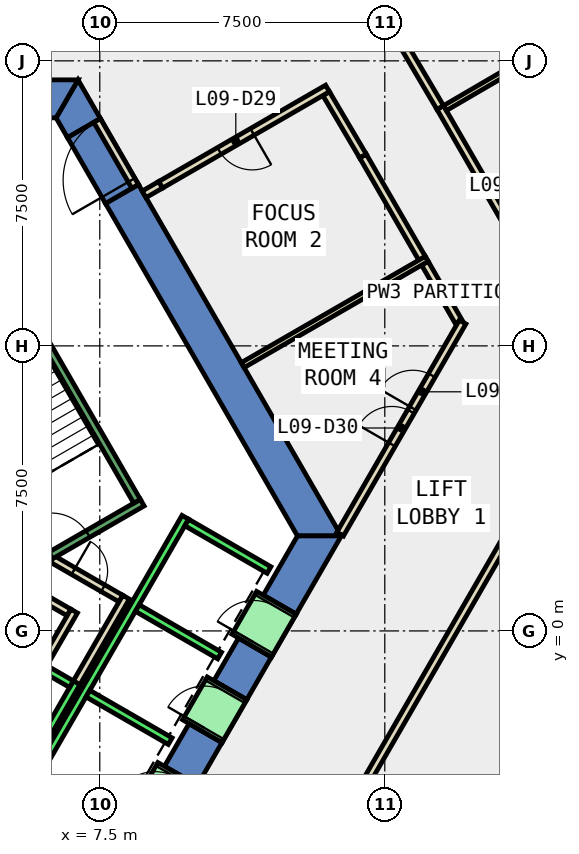
"""IFC4 building model, lengths in metres.
Left out: names, types, materials, properties, quantities, classifications, styles, units other than length and angle.
Written with IfcOpenShell. Run it as: python <this file> out.ifc"""

import sys

from ifc_helpers import new_model, si_unit, direction, frame, frame_2d, origin, place, context, subcontext, project, spatial, polyline, rectangle, outline, extrude, element, fill, save


model = new_model("IFC4")
c1 = context("Model", 3, precision=1e-05, world=origin(), true_north=direction((0.0, 1.0)))
c2 = subcontext(c1, "Body", "Model", "MODEL_VIEW")
j1 = project(units=[si_unit("LENGTHUNIT", "METRE"), si_unit("PLANEANGLEUNIT", "RADIAN")], contexts=[c1])
p1 = place(None, origin())
s1 = spatial("IfcSite", under=j1, at=p1, CompositionType="ELEMENT")
p2 = place(p1, origin())
s2 = spatial("IfcBuilding", under=s1, at=p2, CompositionType="ELEMENT")
p3 = place(p2, frame((0.0, 0.0, 47.6)))
s3 = spatial("IfcBuildingStorey", under=s2, at=p3, CompositionType="ELEMENT", Elevation=47.6)
p4 = place(p3, frame((0.0, 0.0, -0.4)))
e1 = element("IfcWall", 1, at=p4, inside=s3, PredefinedType="SHEAR", context=c2, shape_type="SweptSolid", body=[
    extrude(outline(polyline([(8.517, 11.748), (7.651, 11.248), (12.702, 2.5), (13.856, 2.5), (8.517, 11.748)])), origin(), (0.0, 0.0, 1.0), 4.2),
])
p5 = place(p3, frame((0.0, 0.0, -0.4)))
e2 = element("IfcWall", 2, at=p5, inside=s3, PredefinedType="SHEAR", context=c2, shape_type="SweptSolid", body=[
    extrude(outline(polyline([(6.651, 12.98), (7.517, 13.48), (6.928, 14.5), (6.351, 13.5), (6.651, 12.98)])), origin(), (0.0, 0.0, 1.0), 4.2),
])
p6 = place(p3, frame((0.0, 0.0, 3.6)))
e3 = element("IfcWall", 3, at=p6, inside=s3, PredefinedType="SHEAR", context=c2, shape_type="SweptSolid", body=[
    extrude(outline(polyline([(7.517, 13.48), (6.651, 12.98), (7.651, 11.248), (8.517, 11.748), (7.517, 13.48)])), origin(), (0.0, 0.0, 1.0), 0.2),
])
p7 = place(p3, frame((0.0, 0.0, -0.4)))
e4 = element("IfcWall", 4, at=p7, inside=s3, PredefinedType="SHEAR", context=c2, shape_type="SweptSolid", body=[
    extrude(outline(polyline([(4.55, 14.5), (4.55, 13.5), (6.351, 13.5), (6.928, 14.5), (4.55, 14.5)])), origin(), (0.0, 0.0, 1.0), 4.2),
])
p8 = place(p3, frame((0.0, 0.0, -0.4)))
e5 = element("IfcWall", 5, at=p8, inside=s3, PredefinedType="SHEAR", context=c2, shape_type="SweptSolid", body=[
    extrude(outline(polyline([(10.717, -2.937), (9.851, -2.437), (9.201, -3.563), (10.067, -4.063), (10.717, -2.937)])), origin(), (0.0, 0.0, 1.0), 4.2),
])
p9 = place(p3, frame((0.0, 0.0, -0.4)))
e6 = element("IfcWall", 6, at=p9, inside=s3, PredefinedType="SHEAR", context=c2, shape_type="SweptSolid", body=[
    extrude(outline(polyline([(12.017, -0.686), (11.151, -0.186), (10.501, -1.311), (11.367, -1.811), (12.017, -0.686)])), origin(), (0.0, 0.0, 1.0), 4.2),
])
p10 = place(p3, frame((0.0, 0.0, -0.4)))
e7 = element("IfcWall", 7, at=p10, inside=s3, PredefinedType="SHEAR", context=c2, shape_type="SweptSolid", body=[
    extrude(outline(polyline([(11.801, 0.94), (12.667, 0.44), (13.856, 2.5), (12.702, 2.5), (11.801, 0.94)])), origin(), (0.0, 0.0, 1.0), 4.2),
])
p11 = place(p3, frame((0.0, 0.0, 3.6)))
e8 = element("IfcWall", 8, at=p11, inside=s3, PredefinedType="SHEAR", context=c2, shape_type="SweptSolid", body=[
    extrude(outline(polyline([(10.067, -4.063), (9.201, -3.563), (8.551, -4.689), (9.417, -5.189), (10.067, -4.063)])), origin(), (0.0, 0.0, 1.0), 0.2),
])
p12 = place(p3, frame((0.0, 0.0, 3.6)))
e9 = element("IfcWall", 9, at=p12, inside=s3, PredefinedType="SHEAR", context=c2, shape_type="SweptSolid", body=[
    extrude(outline(polyline([(11.367, -1.811), (10.501, -1.311), (9.851, -2.437), (10.717, -2.937), (11.367, -1.811)])), origin(), (0.0, 0.0, 1.0), 0.2),
])
p13 = place(p3, frame((0.0, 0.0, 3.6)))
e10 = element("IfcWall", 10, at=p13, inside=s3, PredefinedType="SHEAR", context=c2, shape_type="SweptSolid", body=[
    extrude(outline(polyline([(12.667, 0.44), (11.801, 0.94), (11.151, -0.186), (12.017, -0.686), (12.667, 0.44)])), origin(), (0.0, 0.0, 1.0), 0.2),
])
p14 = place(p3, frame((15.98, 9.805, 0.0), z_axis=(0.0, 0.0, 1.0), x_axis=(-0.500150684419, 0.865938388614, 0.0)))
e11 = element("IfcWall", 11, at=p14, inside=s3, PredefinedType="PARTITIONING", context=c2, shape_type="SweptSolid", body=[
    extrude(rectangle(XDim=3.109, YDim=0.2, at=frame_2d((1.554, 0.0))), origin(), (0.0, 0.0, 1.0), 3.8),
])
p15 = place(p3, frame((14.425, 12.497, 0.0), z_axis=(0.0, 0.0, 1.0), x_axis=(-0.508111788435, 0.861291129905, 0.0)))
e12 = element("IfcWall", 12, at=p15, inside=s3, PredefinedType="PARTITIONING", context=c2, shape_type="SweptSolid", body=[
    extrude(rectangle(XDim=1.905, YDim=0.2, at=frame_2d((0.953, 0.0))), origin(), (0.0, 0.0, 1.0), 3.8),
])
p16 = place(p3, frame((13.492, 14.274, 0.0), z_axis=(0.0, 0.0, 1.0), x_axis=(-0.866003598361, -0.5000377662, 0.0)))
e13 = element("IfcWall", 13, at=p16, inside=s3, PredefinedType="PARTITIONING", context=c2, shape_type="SweptSolid", body=[
    extrude(rectangle(XDim=5.071, YDim=0.2, at=frame_2d((2.536, 0.0))), origin(), (0.0, 0.0, 1.0), 3.8),
])
p17 = place(p16, frame((2.286, 0.0, 0.0)))
e14 = element("IfcOpeningElement", 14, at=p17, cuts=e13, PredefinedType="OPENING", context=c2, shape_type="SweptSolid", body=[
    extrude(rectangle(XDim=1.0, YDim=2.1, at=frame_2d((0.5, 1.05))), frame((0.0, 0.11, 0.0), z_axis=(0.0, -1.0, 0.0), x_axis=(1.0, 0.0, 0.0)), (0.0, 0.0, 1.0), 0.22),
])
p18 = place(p3, frame((16.948, 8.128, 0.0), z_axis=(0.0, 0.0, 1.0), x_axis=(-0.499931460552, 0.866064971437, 0.0)))
e15 = element("IfcWall", 15, at=p18, inside=s3, PredefinedType="PARTITIONING", context=c2, shape_type="SweptSolid", body=[
    extrude(rectangle(XDim=1.786, YDim=0.2, at=frame_2d((0.893, 0.0))), origin(), (0.0, 0.0, 1.0), 3.8),
])
p19 = place(p3, frame((16.46, 13.772, 0.0), z_axis=(0.0, 0.0, 1.0), x_axis=(0.500099745063, -0.865967808286, 0.0)))
e16 = element("IfcWall", 16, at=p19, inside=s3, PredefinedType="PARTITIONING", context=c2, shape_type="SweptSolid", body=[
    extrude(rectangle(XDim=7.319, YDim=0.2, at=frame_2d((3.659, 0.0))), origin(), (0.0, 0.0, 1.0), 3.8),
])
p20 = place(p19, frame((3.159, 0.0, 0.0)))
e17 = element("IfcOpeningElement", 17, at=p20, cuts=e16, PredefinedType="OPENING", context=c2, shape_type="SweptSolid", body=[
    extrude(rectangle(XDim=1.0, YDim=2.1, at=frame_2d((0.5, 1.05))), frame((0.0, 0.11, 0.0), z_axis=(0.0, -1.0, 0.0), x_axis=(1.0, 0.0, 0.0)), (0.0, 0.0, 1.0), 0.22),
])
p21 = place(p3, frame((12.815, 19.946, 0.0), z_axis=(0.0, 0.0, 1.0), x_axis=(0.508287536166, -0.861187424768, 0.0)))
e18 = element("IfcWall", 18, at=p21, inside=s3, PredefinedType="PARTITIONING", context=c2, shape_type="SweptSolid", body=[
    extrude(rectangle(XDim=7.169, YDim=0.2, at=frame_2d((3.584, 0.0))), origin(), (0.0, 0.0, 1.0), 3.8),
])
p22 = place(p3, frame((5.499, 1.172, 0.0), z_axis=(0.0, 0.0, 1.0), x_axis=(0.866333505267, -0.499465972466, 0.0)))
e19 = element("IfcWall", 19, at=p22, inside=s3, PredefinedType="PARTITIONING", context=c2, shape_type="SweptSolid", body=[
    extrude(rectangle(XDim=1.374, YDim=0.2, at=frame_2d((0.687, 0.0))), origin(), (0.0, 0.0, 1.0), 3.8),
])
p23 = place(p3, frame((6.826, 0.522, 0.0), z_axis=(0.0, 0.0, 1.0), x_axis=(-0.500016722714, -0.866015748706, 0.0)))
e20 = element("IfcWall", 20, at=p23, inside=s3, PredefinedType="PARTITIONING", context=c2, shape_type="SweptSolid", body=[
    extrude(rectangle(XDim=1.7, YDim=0.2, at=frame_2d((0.85, 0.0))), origin(), (0.0, 0.0, 1.0), 3.8),
])
p24 = place(p3, frame((6.25, 1.894, 0.0), z_axis=(0.0, 0.0, 1.0), x_axis=(0.866043184279, -0.499969202016, 0.0)))
e21 = element("IfcWall", 21, at=p24, inside=s3, PredefinedType="PARTITIONING", context=c2, shape_type="SweptSolid", body=[
    extrude(rectangle(XDim=2.084, YDim=0.2, at=frame_2d((1.042, 0.0))), origin(), (0.0, 0.0, 1.0), 3.8),
])
p25 = place(p24, frame((0.642, 0.0, 0.0)))
e22 = element("IfcOpeningElement", 22, at=p25, cuts=e21, PredefinedType="OPENING", context=c2, shape_type="SweptSolid", body=[
    extrude(rectangle(XDim=0.9, YDim=2.1, at=frame_2d((0.45, 1.05))), frame((0.0, 0.11, 0.0), z_axis=(0.0, -1.0, 0.0), x_axis=(1.0, 0.0, 0.0)), (0.0, 0.0, 1.0), 0.22),
])
p26 = place(p3, frame((8.192, 0.888, 0.0), z_axis=(0.0, 0.0, 1.0), x_axis=(-0.499940625693, -0.866059680843, 0.0)))
e23 = element("IfcWall", 23, at=p26, inside=s3, PredefinedType="PARTITIONING", context=c2, shape_type="SweptSolid", body=[
    extrude(rectangle(XDim=2.68, YDim=0.2, at=frame_2d((1.34, 0.0))), origin(), (0.0, 0.0, 1.0), 3.8),
])
p27 = place(p3, frame((16.104, 9.79, 0.0), z_axis=(0.0, 0.0, 1.0), x_axis=(-0.866023462144, -0.500003363005, 0.0)))
e24 = element("IfcWall", 24, at=p27, inside=s3, PredefinedType="PARTITIONING", context=c2, shape_type="SweptSolid", body=[
    extrude(rectangle(XDim=5.592, YDim=0.15, at=frame_2d((2.796, 0.0))), origin(), (0.0, 0.0, 1.0), 3.8),
])
p28 = place(p3, frame((13.827, 2.55, 0.0), z_axis=(0.0, 0.0, 1.0), x_axis=(0.500093193185, 0.865971591988, 0.0)))
e25 = element("IfcWall", 25, at=p28, inside=s3, PredefinedType="PARTITIONING", context=c2, shape_type="SweptSolid", body=[
    extrude(rectangle(XDim=6.441, YDim=0.2, at=frame_2d((3.221, 0.0))), origin(), (0.0, 0.0, 1.0), 3.8),
])
p29 = place(p28, frame((2.721, 0.0, 0.0)))
e26 = element("IfcOpeningElement", 26, at=p29, cuts=e25, PredefinedType="OPENING", context=c2, shape_type="SweptSolid", body=[
    extrude(rectangle(XDim=1.0, YDim=2.1, at=frame_2d((0.5, 1.05))), frame((0.0, 0.11, 0.0), z_axis=(0.0, -1.0, 0.0), x_axis=(1.0, 0.0, 0.0)), (0.0, 0.0, 1.0), 0.22),
])
p30 = place(p28, frame((3.821, 0.0, 0.0)))
e27 = element("IfcOpeningElement", 27, at=p30, cuts=e25, PredefinedType="OPENING", context=c2, shape_type="SweptSolid", body=[
    extrude(rectangle(XDim=1.0, YDim=2.1, at=frame_2d((0.5, 1.05))), frame((0.0, 0.11, 0.0), z_axis=(0.0, -1.0, 0.0), x_axis=(1.0, 0.0, 0.0)), (0.0, 0.0, 1.0), 0.22),
])
p31 = place(p3, frame((19.257, 4.255, 0.0), z_axis=(0.0, 0.0, 1.0), x_axis=(-0.499978317034, -0.866037922089, 0.0)))
e28 = element("IfcWall", 28, at=p31, inside=s3, PredefinedType="PARTITIONING", context=c2, shape_type="SweptSolid", body=[
    extrude(rectangle(XDim=12.913, YDim=0.2, at=frame_2d((6.456, 0.0))), origin(), (0.0, 0.0, 1.0), 3.8),
])
p32 = place(p3, frame((16.584, 13.757, 0.0), z_axis=(0.0, 0.0, 1.0), x_axis=(0.863565634474, 0.504236447469, 0.0)))
e29 = element("IfcWall", 29, at=p32, inside=s3, PredefinedType="PARTITIONING", context=c2, shape_type="SweptSolid", body=[
    extrude(rectangle(XDim=5.981, YDim=0.15, at=frame_2d((2.99, 0.0))), origin(), (0.0, 0.0, 1.0), 3.8),
])
p33 = place(p3, frame((8.43, 11.698, 0.0), z_axis=(0.0, 0.0, 1.0), x_axis=(-0.50002537861, 0.866010750942, 0.0)))
e30 = element("IfcWall", 30, at=p33, inside=s3, PredefinedType="PARTITIONING", context=c2, shape_type="SweptSolid", body=[
    extrude(rectangle(XDim=2.0, YDim=0.2, at=frame_2d((1.0, 0.0))), origin(), (0.0, 0.0, 1.0), 2.4),
])
p34 = place(p33, frame((0.19, 0.0, 0.0)))
e31 = element("IfcOpeningElement", 31, at=p34, cuts=e30, PredefinedType="OPENING", context=c2, shape_type="SweptSolid", body=[
    extrude(rectangle(XDim=1.8, YDim=2.1, at=frame_2d((0.9, 1.05))), frame((0.0, 0.11, 0.0), z_axis=(0.0, -1.0, 0.0), x_axis=(1.0, 0.0, 0.0)), (0.0, 0.0, 1.0), 0.22),
])
p35 = place(p3, frame((9.1, 11.738, 0.0), z_axis=(0.0, 0.0, 1.0), x_axis=(-0.866071776036, -0.499919672301, 0.0)))
e32 = element("IfcWall", 32, at=p35, inside=s3, PredefinedType="PARTITIONING", context=c2, shape_type="SweptSolid", body=[
    extrude(rectangle(XDim=0.5, YDim=0.2, at=frame_2d((0.25, 0.0))), origin(), (0.0, 0.0, 1.0), 2.4),
])
p36 = place(p3, frame((5.492, -3.788, 0.0), z_axis=(0.0, 0.0, 1.0), x_axis=(0.500011755427, 0.866018616679, 0.0)))
e33 = element("IfcWall", 33, at=p36, inside=s3, PredefinedType="STANDARD", context=c2, shape_type="SweptSolid", body=[
    extrude(rectangle(XDim=2.8, YDim=0.2, at=frame_2d((1.4, 0.0))), origin(), (0.0, 0.0, 1.0), 3.8),
])
p37 = place(p3, frame((4.677, -0.2, 0.0), z_axis=(0.0, 0.0, 1.0), x_axis=(0.865973769406, -0.500089422704, 0.0)))
e34 = element("IfcWall", 34, at=p37, inside=s3, PredefinedType="STANDARD", context=c2, shape_type="SweptSolid", body=[
    extrude(rectangle(XDim=2.399, YDim=0.2, at=frame_2d((1.2, 0.0))), origin(), (0.0, 0.0, 1.0), 3.8),
])
p38 = place(p3, frame((4.451, -6.19, 0.0), z_axis=(0.0, 0.0, 1.0), x_axis=(0.50000090737, 0.866024879913, 0.0)))
e35 = element("IfcWall", 35, at=p38, inside=s3, PredefinedType="STANDARD", context=c2, shape_type="SweptSolid", body=[
    extrude(rectangle(XDim=10.6, YDim=0.2, at=frame_2d((5.3, 0.0))), origin(), (0.0, 0.0, 1.0), 3.8),
])
for number, where, z_axis, x_axis in (
    (36, (7.188, -1.65, 0.0), (0.0, 0.0, 1.0), (0.866, -0.5, 0.0)),
    (37, (8.488, 0.602, 0.0), (0.0, 0.0, 1.0), (0.866, -0.5, 0.0)),
):
    element("IfcWall", number, at=place(p3, frame(where, z_axis=z_axis, x_axis=x_axis)), inside=s3, PredefinedType="STANDARD", context=c2, shape_type="SweptSolid", body=[
        extrude(rectangle(XDim=2.5, YDim=0.2, at=frame_2d((1.25, 0.0))), origin(), (0.0, 0.0, 1.0), 3.8),
    ])
p39 = place(p3, frame((9.788, 2.853, 0.0), z_axis=(0.0, 0.0, 1.0), x_axis=(0.865998541277, -0.500046524342, 0.0)))
e38 = element("IfcWall", 38, at=p39, inside=s3, PredefinedType="STANDARD", context=c2, shape_type="SweptSolid", body=[
    extrude(rectangle(XDim=2.5, YDim=0.2, at=frame_2d((1.25, 0.0))), origin(), (0.0, 0.0, 1.0), 3.8),
])
p40 = place(p3, frame((8.898, -4.889, 0.0), z_axis=(0.0, 0.0, 1.0), x_axis=(0.500036693733, 0.866004217611, 0.0)))
e39 = element("IfcWall", 39, at=p40, inside=s3, PredefinedType="STANDARD", context=c2, shape_type="SweptSolid", body=[
    extrude(rectangle(XDim=1.3, YDim=1.2, at=frame_2d((0.65, 0.0))), origin(), (0.0, 0.0, 1.0), 2.4),
])
p41 = place(p40, frame((0.1, 0.0, 0.0)))
e40 = element("IfcOpeningElement", 40, at=p41, cuts=e39, PredefinedType="OPENING", context=c2, shape_type="SweptSolid", body=[
    extrude(rectangle(XDim=1.1, YDim=2.3, at=frame_2d((0.55, 1.15))), frame((0.0, 0.61, 0.0), z_axis=(0.0, -1.0, 0.0), x_axis=(1.0, 0.0, 0.0)), (0.0, 0.0, 1.0), 1.22),
])
p42 = place(p3, frame((10.198, -2.637, 0.0), z_axis=(0.0, 0.0, 1.0), x_axis=(0.49989585183, 0.866085525409, 0.0)))
e41 = element("IfcWall", 41, at=p42, inside=s3, PredefinedType="STANDARD", context=c2, shape_type="SweptSolid", body=[
    extrude(rectangle(XDim=1.3, YDim=1.2, at=frame_2d((0.65, 0.0))), origin(), (0.0, 0.0, 1.0), 2.4),
])
p43 = place(p42, frame((0.1, 0.0, 0.0)))
e42 = element("IfcOpeningElement", 42, at=p43, cuts=e41, PredefinedType="OPENING", context=c2, shape_type="SweptSolid", body=[
    extrude(rectangle(XDim=1.1, YDim=2.3, at=frame_2d((0.55, 1.15))), frame((0.0, 0.61, 0.0), z_axis=(0.0, -1.0, 0.0), x_axis=(1.0, 0.0, 0.0)), (0.0, 0.0, 1.0), 1.22),
])
p44 = place(p3, frame((11.498, -0.385, 0.0), z_axis=(0.0, 0.0, 1.0), x_axis=(0.500221244143, 0.865897630733, 0.0)))
e43 = element("IfcWall", 43, at=p44, inside=s3, PredefinedType="STANDARD", context=c2, shape_type="SweptSolid", body=[
    extrude(rectangle(XDim=1.299, YDim=1.2, at=frame_2d((0.65, 0.0))), origin(), (0.0, 0.0, 1.0), 2.4),
])
p45 = place(p44, frame((0.1, 0.0, 0.0)))
e44 = element("IfcOpeningElement", 44, at=p45, cuts=e43, PredefinedType="OPENING", context=c2, shape_type="SweptSolid", body=[
    extrude(rectangle(XDim=1.1, YDim=2.3, at=frame_2d((0.55, 1.15))), frame((0.0, 0.61, 0.0), z_axis=(0.0, -1.0, 0.0), x_axis=(1.0, 0.0, 0.0)), (0.0, 0.0, 1.0), 1.22),
])
p46 = place(p3, frame((4.806, 1.176, 0.0), z_axis=(0.0, 0.0, 1.0), x_axis=(0.866059941101, 0.499940174841, 0.0)))
e45 = element("IfcWall", 45, at=p46, inside=s3, PredefinedType="STANDARD", context=c2, shape_type="SweptSolid", body=[
    extrude(rectangle(XDim=4.4, YDim=0.2, at=frame_2d((2.2, 0.0))), origin(), (0.0, 0.0, 1.0), 3.8),
])
p47 = place(p46, frame((1.65, 0.0, 0.0)))
e46 = element("IfcOpeningElement", 46, at=p47, cuts=e45, PredefinedType="OPENING", context=c2, shape_type="SweptSolid", body=[
    extrude(rectangle(XDim=1.1, YDim=2.2, at=frame_2d((0.55, 1.1))), frame((0.0, 0.11, 0.0), z_axis=(0.0, -1.0, 0.0), x_axis=(1.0, 0.0, 0.0)), (0.0, 0.0, 1.0), 0.22),
])
p48 = place(p3, frame((8.48, 3.412, 0.0), z_axis=(0.0, 0.0, 1.0), x_axis=(-0.499978703459, 0.866037698999, 0.0)))
e47 = element("IfcWall", 47, at=p48, inside=s3, PredefinedType="STANDARD", context=c2, shape_type="SweptSolid", body=[
    extrude(rectangle(XDim=6.9, YDim=0.2, at=frame_2d((3.45, 0.0))), origin(), (0.0, 0.0, 1.0), 3.8),
])
p49 = place(p17, origin())
e48 = element("IfcDoor", 48, at=p49, inside=s3, OperationType="SINGLE_SWING_LEFT", PredefinedType="DOOR", context=c2, shape_type="SweptSolid", body=[
    extrude(rectangle(XDim=1.0, YDim=2.1, at=frame_2d((0.5, 1.05))), frame((0.0, 0.025, 0.0), z_axis=(0.0, -1.0, 0.0), x_axis=(1.0, 0.0, 0.0)), (0.0, 0.0, 1.0), 0.05),
])
fill(e14, e48)
p50 = place(p29, origin())
e49 = element("IfcDoor", 49, at=p50, inside=s3, OperationType="SINGLE_SWING_LEFT", PredefinedType="DOOR", context=c2, shape_type="SweptSolid", body=[
    extrude(rectangle(XDim=1.0, YDim=2.1, at=frame_2d((0.5, 1.05))), frame((0.0, 0.025, 0.0), z_axis=(0.0, -1.0, 0.0), x_axis=(1.0, 0.0, 0.0)), (0.0, 0.0, 1.0), 0.05),
])
fill(e26, e49)
p51 = place(p25, origin())
e50 = element("IfcDoor", 50, at=p51, inside=s3, OperationType="SINGLE_SWING_LEFT", PredefinedType="DOOR", context=c2, shape_type="SweptSolid", body=[
    extrude(rectangle(XDim=0.9, YDim=2.1, at=frame_2d((0.45, 1.05))), frame((0.0, 0.025, 0.0), z_axis=(0.0, -1.0, 0.0), x_axis=(1.0, 0.0, 0.0)), (0.0, 0.0, 1.0), 0.05),
])
fill(e22, e50)
p52 = place(p30, origin())
e51 = element("IfcDoor", 51, at=p52, inside=s3, OperationType="SINGLE_SWING_RIGHT", PredefinedType="DOOR", context=c2, shape_type="SweptSolid", body=[
    extrude(rectangle(XDim=1.0, YDim=2.1, at=frame_2d((0.5, 1.05))), frame((0.0, 0.025, 0.0), z_axis=(0.0, -1.0, 0.0), x_axis=(1.0, 0.0, 0.0)), (0.0, 0.0, 1.0), 0.05),
])
fill(e27, e51)
p53 = place(p34, origin())
e52 = element("IfcDoor", 52, at=p53, inside=s3, OperationType="DOUBLE_DOOR_SINGLE_SWING", PredefinedType="DOOR", context=c2, shape_type="SweptSolid", body=[
    extrude(rectangle(XDim=1.8, YDim=2.1, at=frame_2d((0.9, 1.05))), frame((0.0, 0.025, 0.0), z_axis=(0.0, -1.0, 0.0), x_axis=(1.0, 0.0, 0.0)), (0.0, 0.0, 1.0), 0.05),
])
fill(e31, e52)
p54 = place(p43, origin())
e53 = element("IfcDoor", 53, at=p54, inside=s3, OperationType="SLIDING_TO_LEFT", PredefinedType="DOOR", context=c2, shape_type="SweptSolid", body=[
    extrude(rectangle(XDim=1.1, YDim=2.3, at=frame_2d((0.55, 1.15))), frame((0.0, 0.025, 0.0), z_axis=(0.0, -1.0, 0.0), x_axis=(1.0, 0.0, 0.0)), (0.0, 0.0, 1.0), 0.05),
])
fill(e42, e53)
p55 = place(p45, origin())
e54 = element("IfcDoor", 54, at=p55, inside=s3, OperationType="SLIDING_TO_LEFT", PredefinedType="DOOR", context=c2, shape_type="SweptSolid", body=[
    extrude(rectangle(XDim=1.1, YDim=2.3, at=frame_2d((0.55, 1.15))), frame((0.0, 0.025, 0.0), z_axis=(0.0, -1.0, 0.0), x_axis=(1.0, 0.0, 0.0)), (0.0, 0.0, 1.0), 0.05),
])
fill(e44, e54)
p56 = place(p47, origin())
e55 = element("IfcDoor", 55, at=p56, inside=s3, OperationType="SINGLE_SWING_LEFT", PredefinedType="DOOR", context=c2, shape_type="SweptSolid", body=[
    extrude(rectangle(XDim=1.1, YDim=2.2, at=frame_2d((0.55, 1.1))), frame((0.0, 0.025, 0.0), z_axis=(0.0, -1.0, 0.0), x_axis=(1.0, 0.0, 0.0)), (0.0, 0.0, 1.0), 0.05),
])
fill(e46, e55)
save(model, sys.argv[1])
